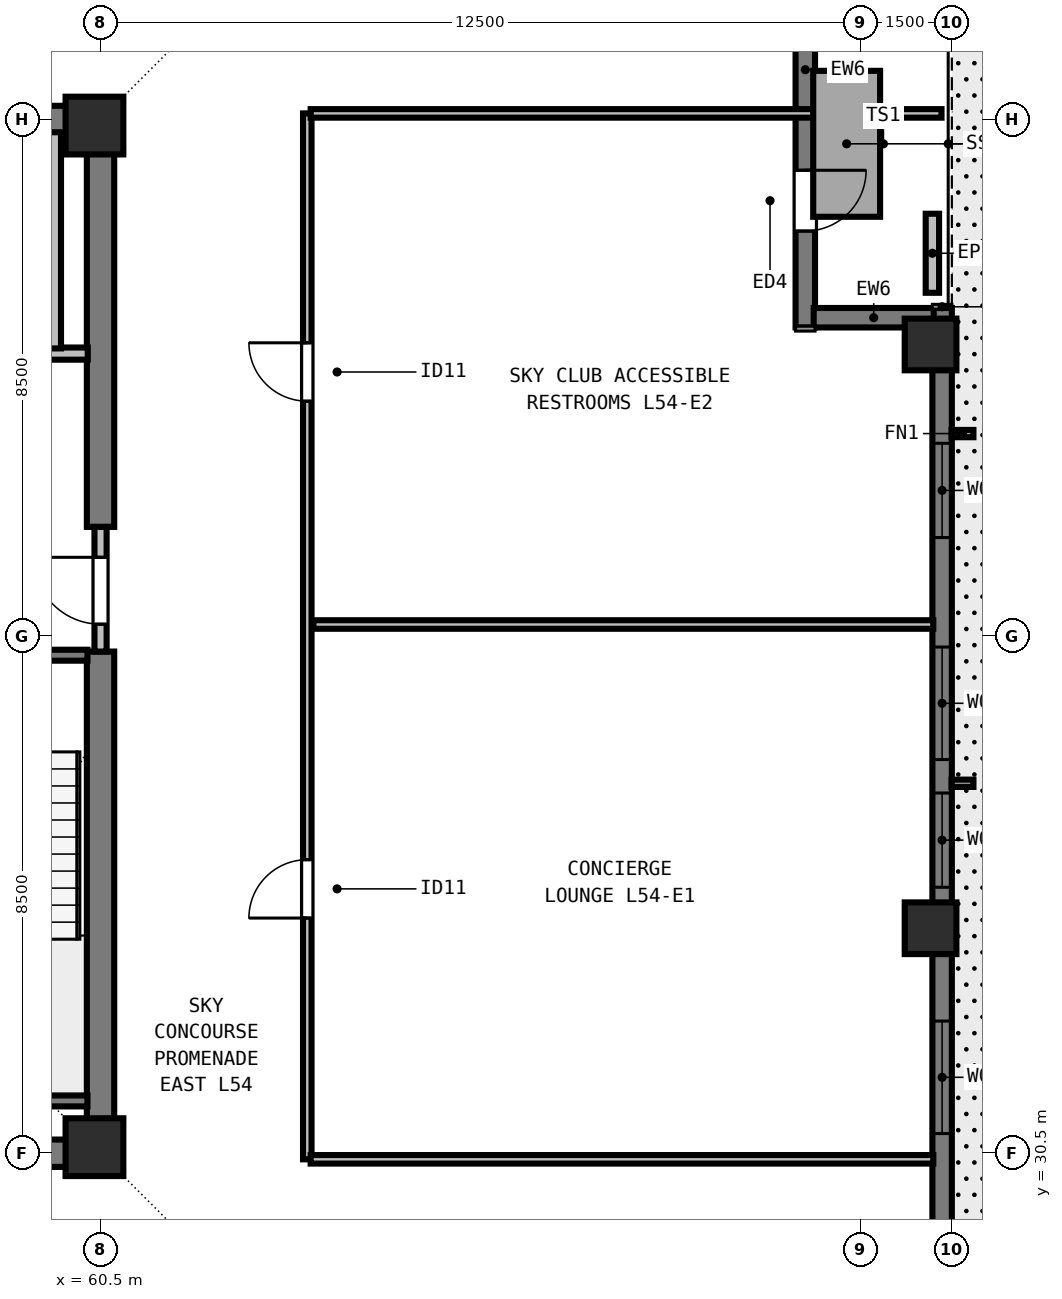
"""IFC4 building model, lengths in metres.
Left out: names, types, materials, properties, quantities, classifications, styles, units other than length and angle.
Written with IfcOpenShell. Run it as: python <this file> out.ifc"""

import sys

from ifc_helpers import new_model, si_unit, direction, frame, frame_2d, origin, origin_2d, place, context, subcontext, project, spatial, rectangle, extrude, element, fill, save


model = new_model("IFC4")
c1 = context("Model", 3, precision=1e-05, world=origin(), true_north=direction((0.0, 1.0)))
c2 = subcontext(c1, "Body", "Model", "MODEL_VIEW")
j1 = project(units=[si_unit("LENGTHUNIT", "METRE"), si_unit("PLANEANGLEUNIT", "RADIAN")], contexts=[c1])
p1 = place(None, origin())
s1 = spatial("IfcSite", under=j1, at=p1, CompositionType="ELEMENT")
p2 = place(p1, origin())
s2 = spatial("IfcBuilding", under=s1, at=p2, CompositionType="ELEMENT")
p3 = place(p2, frame((0.0, 0.0, 198.0)))
s3 = spatial("IfcBuildingStorey", under=s2, at=p3, CompositionType="ELEMENT", Elevation=198.0)
for number, where, z_axis, x_axis in (
    (1, (60.4, 30.6, 0.0), (0.0, 0.0, 1.0), (1.0, 0.0, 0.0)),
    (2, (60.4, 47.4, 0.0), (0.0, 0.0, 1.0), (1.0, 0.0, 0.0)),
):
    element("IfcColumn", number, at=place(p3, frame(where, z_axis=z_axis, x_axis=x_axis)), inside=s3, PredefinedType="COLUMN", context=c2, shape_type="SweptSolid", body=[
        extrude(rectangle(XDim=0.95, YDim=0.95, at=origin_2d()), origin(), (0.0, 0.0, 1.0), 4.5),
    ])
for number, where, z_axis, x_axis in (
    (3, (74.15, 34.2, 0.0), (0.0, 0.0, 1.0), (0.0, 1.0, 0.0)),
    (4, (74.15, 43.8, 0.0), (0.0, 0.0, 1.0), (0.0, 1.0, 0.0)),
):
    element("IfcColumn", number, at=place(p3, frame(where, z_axis=z_axis, x_axis=x_axis)), inside=s3, PredefinedType="COLUMN", context=c2, shape_type="SweptSolid", body=[
        extrude(rectangle(XDim=0.85, YDim=0.85, at=origin_2d()), origin(), (0.0, 0.0, 1.0), 4.5),
    ])
p4 = place(p3, frame((74.34, 44.4, 0.0), z_axis=(0.0, 0.0, 1.0), x_axis=(0.0, -1.0, 0.0)))
e5 = element("IfcWall", 5, at=p4, inside=s3, PredefinedType="SOLIDWALL", context=c2, shape_type="SweptSolid", body=[
    extrude(rectangle(XDim=22.602, YDim=0.32, at=frame_2d((11.301, 0.0))), origin(), (0.0, 0.0, 1.0), 4.29),
])
p5 = place(p4, frame((2.225, 0.0, 0.8)))
e6 = element("IfcOpeningElement", 6, at=p5, cuts=e5, PredefinedType="OPENING", context=c2, shape_type="SweptSolid", body=[
    extrude(rectangle(XDim=1.55, YDim=1.8, at=frame_2d((0.775, 0.9))), frame((0.0, 0.17, 0.0), z_axis=(0.0, -1.0, 0.0), x_axis=(1.0, 0.0, 0.0)), (0.0, 0.0, 1.0), 0.34),
])
p6 = place(p4, frame((5.576, 0.0, 0.8)))
e7 = element("IfcOpeningElement", 7, at=p6, cuts=e5, PredefinedType="OPENING", context=c2, shape_type="SweptSolid", body=[
    extrude(rectangle(XDim=1.85, YDim=1.85, at=frame_2d((0.925, 0.925))), frame((0.0, 0.17, 0.0), z_axis=(0.0, -1.0, 0.0), x_axis=(1.0, 0.0, 0.0)), (0.0, 0.0, 1.0), 0.34),
])
p7 = place(p4, frame((7.976, 0.0, 0.8)))
e8 = element("IfcOpeningElement", 8, at=p7, cuts=e5, PredefinedType="OPENING", context=c2, shape_type="SweptSolid", body=[
    extrude(rectangle(XDim=1.55, YDim=1.8, at=frame_2d((0.775, 0.9))), frame((0.0, 0.17, 0.0), z_axis=(0.0, -1.0, 0.0), x_axis=(1.0, 0.0, 0.0)), (0.0, 0.0, 1.0), 0.34),
])
p8 = place(p4, frame((11.726, 0.0, 0.8)))
e9 = element("IfcOpeningElement", 9, at=p8, cuts=e5, PredefinedType="OPENING", context=c2, shape_type="SweptSolid", body=[
    extrude(rectangle(XDim=1.85, YDim=1.85, at=frame_2d((0.925, 0.925))), frame((0.0, 0.17, 0.0), z_axis=(0.0, -1.0, 0.0), x_axis=(1.0, 0.0, 0.0)), (0.0, 0.0, 1.0), 0.34),
])
p9 = place(p4, frame((15.377, 0.0, 0.8)))
e10 = element("IfcOpeningElement", 10, at=p9, cuts=e5, PredefinedType="OPENING", context=c2, shape_type="SweptSolid", body=[
    extrude(rectangle(XDim=1.55, YDim=1.8, at=frame_2d((0.775, 0.9))), frame((0.0, 0.17, 0.0), z_axis=(0.0, -1.0, 0.0), x_axis=(1.0, 0.0, 0.0)), (0.0, 0.0, 1.0), 0.34),
])
p10 = place(p4, frame((18.2, 0.0, 0.0)))
e11 = element("IfcOpeningElement", 11, at=p10, cuts=e5, PredefinedType="OPENING", context=c2, shape_type="SweptSolid", body=[
    extrude(rectangle(XDim=1.15, YDim=2.15, at=frame_2d((0.575, 1.075))), frame((0.0, 0.17, 0.0), z_axis=(0.0, -1.0, 0.0), x_axis=(1.0, 0.0, 0.0)), (0.0, 0.0, 1.0), 0.34),
])
p11 = place(p3, frame((72.09, 49.822, 0.0), z_axis=(0.0, 0.0, 1.0), x_axis=(0.0, -1.0, 0.0)))
e12 = element("IfcWall", 12, at=p11, inside=s3, PredefinedType="SOLIDWALL", context=c2, shape_type="SweptSolid", body=[
    extrude(rectangle(XDim=5.742, YDim=0.32, at=frame_2d((2.871, 0.0))), origin(), (0.0, 0.0, 1.0), 4.29),
])
p12 = place(p11, frame((3.157, 0.0, 0.0)))
e13 = element("IfcOpeningElement", 13, at=p12, cuts=e12, PredefinedType="OPENING", context=c2, shape_type="SweptSolid", body=[
    extrude(rectangle(XDim=1.0, YDim=2.15, at=frame_2d((0.5, 1.075))), frame((0.0, 0.17, 0.0), z_axis=(0.0, -1.0, 0.0), x_axis=(1.0, 0.0, 0.0)), (0.0, 0.0, 1.0), 0.34),
])
p13 = place(p3, frame((72.228, 44.24, 0.0), z_axis=(0.0, 0.0, 1.0), x_axis=(1.0, 0.0, 0.0)))
e14 = element("IfcWall", 14, at=p13, inside=s3, PredefinedType="SOLIDWALL", context=c2, shape_type="SweptSolid", body=[
    extrude(rectangle(XDim=1.974, YDim=0.32, at=frame_2d((0.987, 0.0))), origin(), (0.0, 0.0, 1.0), 4.29),
])
p14 = place(p3, frame((74.18, 44.65, 0.0), z_axis=(0.0, 0.0, 1.0), x_axis=(0.0, 1.0, 0.0)))
e15 = element("IfcWall", 15, at=p14, inside=s3, PredefinedType="PARAPET", context=c2, shape_type="SweptSolid", body=[
    extrude(rectangle(XDim=1.3, YDim=0.22, at=frame_2d((0.65, 0.0))), origin(), (0.0, 0.0, 1.0), 0.55),
])
for number, where, z_axis, x_axis in (
    (16, (43.275, 30.5, 0.0), (0.0, 0.0, 1.0), (1.0, 0.0, 0.0)),
    (17, (43.275, 47.5, 0.0), (0.0, 0.0, 1.0), (1.0, 0.0, 0.0)),
):
    element("IfcWall", number, at=place(p3, frame(where, z_axis=z_axis, x_axis=x_axis)), inside=s3, PredefinedType="SHEAR", context=c2, shape_type="SweptSolid", body=[
        extrude(rectangle(XDim=17.45, YDim=0.45, at=frame_2d((8.725, 0.0))), origin(), (0.0, 0.0, 1.0), 4.29),
    ])
p15 = place(p3, frame((60.5, 30.715, 0.0), z_axis=(0.0, 0.0, 1.0), x_axis=(0.0, 1.0, 0.0)))
e18 = element("IfcWall", 18, at=p15, inside=s3, PredefinedType="SHEAR", context=c2, shape_type="SweptSolid", body=[
    extrude(rectangle(XDim=8.035, YDim=0.45, at=frame_2d((4.018, 0.0))), origin(), (0.0, 0.0, 1.0), 4.29),
])
p16 = place(p3, frame((60.5, 40.8, 0.0), z_axis=(0.0, 0.0, 1.0), x_axis=(0.0, 1.0, 0.0)))
e19 = element("IfcWall", 19, at=p16, inside=s3, PredefinedType="SHEAR", context=c2, shape_type="SweptSolid", body=[
    extrude(rectangle(XDim=6.485, YDim=0.45, at=frame_2d((3.242, 0.0))), origin(), (0.0, 0.0, 1.0), 4.29),
])
p17 = place(p3, frame((60.5, 38.75, 0.0), z_axis=(0.0, 0.0, 1.0), x_axis=(0.0, 1.0, 0.0)))
e20 = element("IfcWall", 20, at=p17, inside=s3, PredefinedType="SOLIDWALL", context=c2, shape_type="SweptSolid", body=[
    extrude(rectangle(XDim=2.05, YDim=0.2, at=frame_2d((1.025, 0.0))), origin(), (0.0, 0.0, 1.0), 4.29),
])
p18 = place(p17, frame((0.45, 0.0, 0.0)))
e21 = element("IfcOpeningElement", 21, at=p18, cuts=e20, PredefinedType="OPENING", context=c2, shape_type="SweptSolid", body=[
    extrude(rectangle(XDim=1.1, YDim=2.15, at=frame_2d((0.55, 1.075))), frame((0.0, 0.11, 0.0), z_axis=(0.0, -1.0, 0.0), x_axis=(1.0, 0.0, 0.0)), (0.0, 0.0, 1.0), 0.22),
])
p19 = place(p3, frame((56.735, 43.65, 0.0), z_axis=(0.0, 0.0, 1.0), x_axis=(1.0, 0.0, 0.0)))
e22 = element("IfcWall", 22, at=p19, inside=s3, PredefinedType="SOLIDWALL", context=c2, shape_type="SweptSolid", body=[
    extrude(rectangle(XDim=3.555, YDim=0.2, at=frame_2d((1.777, 0.0))), origin(), (0.0, 0.0, 1.0), 4.29),
])
p20 = place(p19, frame((1.295, 0.0, 0.0)))
e23 = element("IfcOpeningElement", 23, at=p20, cuts=e22, PredefinedType="OPENING", context=c2, shape_type="SweptSolid", body=[
    extrude(rectangle(XDim=1.1, YDim=2.2, at=frame_2d((0.55, 1.1))), frame((0.0, 0.11, 0.0), z_axis=(0.0, -1.0, 0.0), x_axis=(1.0, 0.0, 0.0)), (0.0, 0.0, 1.0), 0.22),
])
p21 = place(p3, frame((59.75, 43.735, 0.0), z_axis=(0.0, 0.0, 1.0), x_axis=(0.0, 1.0, 0.0)))
e24 = element("IfcWall", 24, at=p21, inside=s3, PredefinedType="SOLIDWALL", context=c2, shape_type="SweptSolid", body=[
    extrude(rectangle(XDim=3.555, YDim=0.2, at=frame_2d((1.777, 0.0))), origin(), (0.0, 0.0, 1.0), 4.29),
])
p22 = place(p3, frame((63.9, 30.4, 0.0), z_axis=(0.0, 0.0, 1.0), x_axis=(0.0, 1.0, 0.0)))
e25 = element("IfcWall", 25, at=p22, inside=s3, PredefinedType="PARTITIONING", context=c2, shape_type="SweptSolid", body=[
    extrude(rectangle(XDim=17.2, YDim=0.14, at=frame_2d((8.6, 0.0))), origin(), (0.0, 0.0, 1.0), 4.29),
])
p23 = place(p22, frame((3.968, 0.0, 0.0)))
e26 = element("IfcOpeningElement", 26, at=p23, cuts=e25, PredefinedType="OPENING", context=c2, shape_type="SweptSolid", body=[
    extrude(rectangle(XDim=0.96, YDim=2.12, at=frame_2d((0.48, 1.06))), frame((0.0, 0.08, 0.0), z_axis=(0.0, -1.0, 0.0), x_axis=(1.0, 0.0, 0.0)), (0.0, 0.0, 1.0), 0.16),
])
p24 = place(p22, frame((12.468, 0.0, 0.0)))
e27 = element("IfcOpeningElement", 27, at=p24, cuts=e25, PredefinedType="OPENING", context=c2, shape_type="SweptSolid", body=[
    extrude(rectangle(XDim=0.96, YDim=2.12, at=frame_2d((0.48, 1.06))), frame((0.0, 0.08, 0.0), z_axis=(0.0, -1.0, 0.0), x_axis=(1.0, 0.0, 0.0)), (0.0, 0.0, 1.0), 0.16),
])
p25 = place(p3, frame((63.955, 30.4, 0.0), z_axis=(0.0, 0.0, 1.0), x_axis=(1.0, 0.0, 0.0)))
e28 = element("IfcWall", 28, at=p25, inside=s3, PredefinedType="PARTITIONING", context=c2, shape_type="SweptSolid", body=[
    extrude(rectangle(XDim=10.24, YDim=0.14, at=frame_2d((5.12, 0.0))), origin(), (0.0, 0.0, 1.0), 4.29),
])
p26 = place(p3, frame((63.955, 47.6, 0.0), z_axis=(0.0, 0.0, 1.0), x_axis=(1.0, 0.0, 0.0)))
e29 = element("IfcWall", 29, at=p26, inside=s3, PredefinedType="PARTITIONING", context=c2, shape_type="SweptSolid", body=[
    extrude(rectangle(XDim=10.375, YDim=0.14, at=frame_2d((5.188, 0.0))), origin(), (0.0, 0.0, 1.0), 4.29),
])
p27 = place(p3, frame((64.0, 39.195, 0.0), z_axis=(0.0, 0.0, 1.0), x_axis=(1.0, 0.0, 0.0)))
e30 = element("IfcWall", 30, at=p27, inside=s3, PredefinedType="PARTITIONING", context=c2, shape_type="SweptSolid", body=[
    extrude(rectangle(XDim=10.195, YDim=0.14, at=frame_2d((5.098, 0.0))), origin(), (0.0, 0.0, 1.0), 4.29),
])
p28 = place(p3, frame((57.005, 38.69, 0.0), z_axis=(0.0, 0.0, 1.0), x_axis=(1.0, 0.0, 0.0)))
e31 = element("IfcWall", 31, at=p28, inside=s3, PredefinedType="SOLIDWALL", context=c2, shape_type="SweptSolid", body=[
    extrude(rectangle(XDim=3.28, YDim=0.18, at=frame_2d((1.64, 0.0))), origin(), (0.0, 0.0, 1.0), 4.29),
])
p29 = place(p28, frame((1.165, 0.0, 0.0)))
e32 = element("IfcOpeningElement", 32, at=p29, cuts=e31, PredefinedType="OPENING", context=c2, shape_type="SweptSolid", body=[
    extrude(rectangle(XDim=0.95, YDim=2.15, at=frame_2d((0.475, 1.075))), frame((0.0, 0.1, 0.0), z_axis=(0.0, -1.0, 0.0), x_axis=(1.0, 0.0, 0.0)), (0.0, 0.0, 1.0), 0.2),
])
p30 = place(p3, frame((57.005, 31.36, 0.0), z_axis=(0.0, 0.0, 1.0), x_axis=(1.0, 0.0, 0.0)))
e33 = element("IfcWall", 33, at=p30, inside=s3, PredefinedType="SOLIDWALL", context=c2, shape_type="SweptSolid", body=[
    extrude(rectangle(XDim=3.28, YDim=0.18, at=frame_2d((1.64, 0.0))), origin(), (0.0, 0.0, 1.0), 4.29),
])
p31 = place(p5, origin())
e34 = element("IfcWindow", 34, at=p31, inside=s3, PartitioningType="SINGLE_PANEL", PredefinedType="WINDOW", context=c2, shape_type="SweptSolid", body=[
    extrude(rectangle(XDim=1.55, YDim=1.8, at=frame_2d((0.775, 0.9))), frame((0.0, -0.05, 0.0), z_axis=(0.0, -1.0, 0.0), x_axis=(1.0, 0.0, 0.0)), (0.0, 0.0, 1.0), 0.06),
])
fill(e6, e34)
p32 = place(p6, origin())
e35 = element("IfcWindow", 35, at=p32, inside=s3, PartitioningType="SINGLE_PANEL", PredefinedType="WINDOW", context=c2, shape_type="SweptSolid", body=[
    extrude(rectangle(XDim=1.85, YDim=1.85, at=frame_2d((0.925, 0.925))), frame((0.0, -0.05, 0.0), z_axis=(0.0, -1.0, 0.0), x_axis=(1.0, 0.0, 0.0)), (0.0, 0.0, 1.0), 0.06),
])
fill(e7, e35)
p33 = place(p7, origin())
e36 = element("IfcWindow", 36, at=p33, inside=s3, PartitioningType="SINGLE_PANEL", PredefinedType="WINDOW", context=c2, shape_type="SweptSolid", body=[
    extrude(rectangle(XDim=1.55, YDim=1.8, at=frame_2d((0.775, 0.9))), frame((0.0, -0.05, 0.0), z_axis=(0.0, -1.0, 0.0), x_axis=(1.0, 0.0, 0.0)), (0.0, 0.0, 1.0), 0.06),
])
fill(e8, e36)
p34 = place(p8, origin())
e37 = element("IfcWindow", 37, at=p34, inside=s3, PartitioningType="SINGLE_PANEL", PredefinedType="WINDOW", context=c2, shape_type="SweptSolid", body=[
    extrude(rectangle(XDim=1.85, YDim=1.85, at=frame_2d((0.925, 0.925))), frame((0.0, -0.05, 0.0), z_axis=(0.0, -1.0, 0.0), x_axis=(1.0, 0.0, 0.0)), (0.0, 0.0, 1.0), 0.06),
])
fill(e9, e37)
p35 = place(p12, origin())
e38 = element("IfcDoor", 38, at=p35, inside=s3, OperationType="SINGLE_SWING_LEFT", PredefinedType="DOOR", context=c2, shape_type="SweptSolid", body=[
    extrude(rectangle(XDim=1.0, YDim=2.15, at=frame_2d((0.5, 1.075))), frame((0.0, 0.025, 0.0), z_axis=(0.0, -1.0, 0.0), x_axis=(1.0, 0.0, 0.0)), (0.0, 0.0, 1.0), 0.05),
])
fill(e13, e38)
p36 = place(p18, origin())
e39 = element("IfcDoor", 39, at=p36, inside=s3, OperationType="SINGLE_SWING_RIGHT", PredefinedType="DOOR", context=c2, shape_type="SweptSolid", body=[
    extrude(rectangle(XDim=1.1, YDim=2.15, at=frame_2d((0.55, 1.075))), frame((0.0, 0.025, 0.0), z_axis=(0.0, -1.0, 0.0), x_axis=(1.0, 0.0, 0.0)), (0.0, 0.0, 1.0), 0.05),
])
fill(e21, e39)
p37 = place(p23, origin())
e40 = element("IfcDoor", 40, at=p37, inside=s3, OperationType="SINGLE_SWING_LEFT", PredefinedType="DOOR", context=c2, shape_type="SweptSolid", body=[
    extrude(rectangle(XDim=0.96, YDim=2.12, at=frame_2d((0.48, 1.06))), frame((0.0, 0.025, 0.0), z_axis=(0.0, -1.0, 0.0), x_axis=(1.0, 0.0, 0.0)), (0.0, 0.0, 1.0), 0.05),
])
fill(e26, e40)
p38 = place(p24, origin())
e41 = element("IfcDoor", 41, at=p38, inside=s3, OperationType="SINGLE_SWING_RIGHT", PredefinedType="DOOR", context=c2, shape_type="SweptSolid", body=[
    extrude(rectangle(XDim=0.96, YDim=2.12, at=frame_2d((0.48, 1.06))), frame((0.0, 0.025, 0.0), z_axis=(0.0, -1.0, 0.0), x_axis=(1.0, 0.0, 0.0)), (0.0, 0.0, 1.0), 0.05),
])
fill(e27, e41)
save(model, sys.argv[1])
